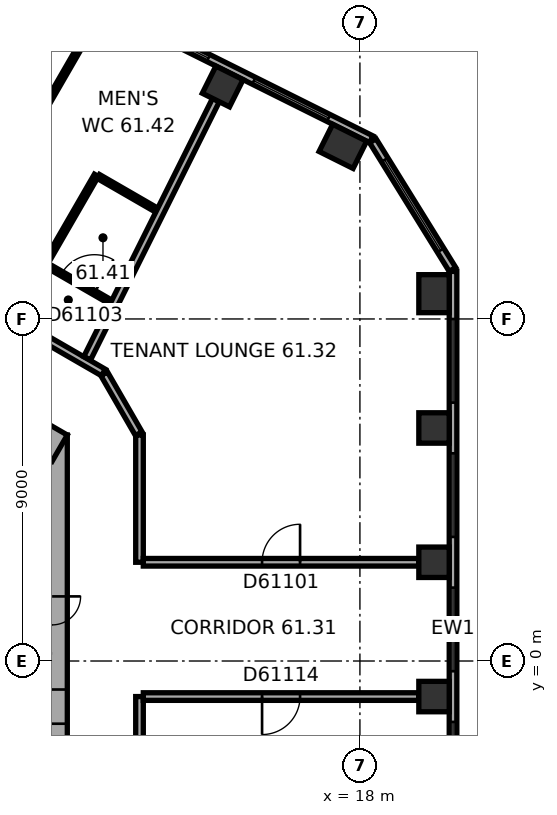
"""IFC4 building model, lengths in metres.
Left out: names, types, materials, properties, quantities, classifications, styles, units other than length and angle.
Written with IfcOpenShell. Run it as: python <this file> out.ifc"""

import sys

from ifc_helpers import new_model, si_unit, direction, frame, frame_2d, origin, origin_2d, place, context, subcontext, project, spatial, rectangle, extrude, element, fill, save


model = new_model("IFC4")
c1 = context("Model", 3, precision=1e-05, world=origin(), true_north=direction((0.0, 1.0)))
c2 = subcontext(c1, "Body", "Model", "MODEL_VIEW")
j1 = project(units=[si_unit("LENGTHUNIT", "METRE"), si_unit("PLANEANGLEUNIT", "RADIAN")], contexts=[c1])
p1 = place(None, origin())
s1 = spatial("IfcSite", under=j1, at=p1, CompositionType="ELEMENT")
p2 = place(p1, origin())
s2 = spatial("IfcBuilding", under=s1, at=p2, CompositionType="ELEMENT")
p3 = place(p2, frame((0.0, 0.0, 247.6)))
s3 = spatial("IfcBuildingStorey", under=s2, at=p3, CompositionType="ELEMENT", Elevation=247.6)
for number, where, z_axis, x_axis in (
    (1, (19.95, -0.936, 0.0), (0.0, 0.0, 1.0), (0.0, 1.0, 0.0)),
    (2, (19.95, 2.598, 0.0), (0.0, 0.0, 1.0), (0.0, 1.0, 0.0)),
    (3, (19.95, 6.132, 0.0), (0.0, 0.0, 1.0), (0.0, 1.0, 0.0)),
):
    element("IfcColumn", number, at=place(p3, frame(where, z_axis=z_axis, x_axis=x_axis)), inside=s3, PredefinedType="COLUMN", context=c2, shape_type="SweptSolid", body=[
        extrude(rectangle(XDim=0.8, YDim=0.8, at=origin_2d()), origin(), (0.0, 0.0, 1.0), 3.7),
    ])
for number, where, z_axis, x_axis in (
    (4, (19.95, 9.665, 0.0), (0.0, 0.0, 1.0), (0.0, 1.0, 0.0)),
    (5, (17.552, 13.541, 0.0), (0.0, 0.0, 1.0), (-0.895, 0.446, 0.0)),
):
    element("IfcColumn", number, at=place(p3, frame(where, z_axis=z_axis, x_axis=x_axis)), inside=s3, PredefinedType="COLUMN", context=c2, shape_type="SweptSolid", body=[
        extrude(rectangle(XDim=1.0, YDim=0.8, at=origin_2d()), origin(), (0.0, 0.0, 1.0), 3.7),
    ])
p4 = place(p3, frame((14.389, 15.118, 0.0), z_axis=(0.0, 0.0, 1.0), x_axis=(-0.894934361602, 0.44619781311, 0.0)))
e6 = element("IfcColumn", 6, at=p4, inside=s3, PredefinedType="COLUMN", context=c2, shape_type="SweptSolid", body=[
    extrude(rectangle(XDim=0.8, YDim=0.8, at=origin_2d()), origin(), (0.0, 0.0, 1.0), 3.7),
])
p5 = place(p3, frame((9.9, -5.947, 0.0), z_axis=(0.0, 0.0, 1.0), x_axis=(0.0, 1.0, 0.0)))
e7 = element("IfcWall", 7, at=p5, inside=s3, PredefinedType="SHEAR", context=c2, shape_type="SweptSolid", body=[
    extrude(rectangle(XDim=11.894, YDim=0.8, at=frame_2d((5.947, 0.0))), origin(), (0.0, 0.0, 1.0), 3.7),
])
p6 = place(p5, frame((6.147, 0.0, 0.0)))
e8 = element("IfcOpeningElement", 8, at=p6, cuts=e7, PredefinedType="OPENING", context=c2, shape_type="SweptSolid", body=[
    extrude(rectangle(XDim=1.5, YDim=2.1, at=frame_2d((0.75, 1.05))), frame((0.0, 0.41, 0.0), z_axis=(0.0, -1.0, 0.0), x_axis=(1.0, 0.0, 0.0)), (0.0, 0.0, 1.0), 0.82),
])
p7 = place(p5, frame((1.697, 0.0, 0.0)))
e9 = element("IfcOpeningElement", 9, at=p7, cuts=e7, PredefinedType="OPENING", context=c2, shape_type="SweptSolid", body=[
    extrude(rectangle(XDim=0.9, YDim=2.1, at=frame_2d((0.45, 1.05))), frame((0.0, 0.41, 0.0), z_axis=(0.0, -1.0, 0.0), x_axis=(1.0, 0.0, 0.0)), (0.0, 0.0, 1.0), 0.82),
])
p8 = place(p5, frame((4.297, 0.0, 0.0)))
e10 = element("IfcOpeningElement", 10, at=p8, cuts=e7, PredefinedType="OPENING", context=c2, shape_type="SweptSolid", body=[
    extrude(rectangle(XDim=0.9, YDim=2.1, at=frame_2d((0.45, 1.05))), frame((0.0, 0.41, 0.0), z_axis=(0.0, -1.0, 0.0), x_axis=(1.0, 0.0, 0.0)), (0.0, 0.0, 1.0), 0.82),
])
p9 = place(p3, frame((10.1, 5.6, 0.0), z_axis=(0.0, 0.0, 1.0), x_axis=(-0.866023897231, 0.500002609418, 0.0)))
e11 = element("IfcWall", 11, at=p9, inside=s3, PredefinedType="SHEAR", context=c2, shape_type="SweptSolid", body=[
    extrude(rectangle(XDim=11.894, YDim=0.8, at=frame_2d((5.947, 0.0))), origin(), (0.0, 0.0, 1.0), 3.7),
])
p10 = place(p9, frame((3.897, 0.0, 0.0)))
e12 = element("IfcOpeningElement", 12, at=p10, cuts=e11, PredefinedType="OPENING", context=c2, shape_type="SweptSolid", body=[
    extrude(rectangle(XDim=0.9, YDim=2.1, at=frame_2d((0.45, 1.05))), frame((0.0, 0.41, 0.0), z_axis=(0.0, -1.0, 0.0), x_axis=(1.0, 0.0, 0.0)), (0.0, 0.0, 1.0), 0.82),
])
p11 = place(p9, frame((7.797, 0.0, 0.0)))
e13 = element("IfcOpeningElement", 13, at=p11, cuts=e11, PredefinedType="OPENING", context=c2, shape_type="SweptSolid", body=[
    extrude(rectangle(XDim=0.9, YDim=2.1, at=frame_2d((0.45, 1.05))), frame((0.0, 0.41, 0.0), z_axis=(0.0, -1.0, 0.0), x_axis=(1.0, 0.0, 0.0)), (0.0, 0.0, 1.0), 0.82),
])
p12 = place(p3, frame((20.45, -8.59, 0.0), z_axis=(0.0, 0.0, 1.0), x_axis=(0.0, 1.0, 0.0)))
e14 = element("IfcWall", 14, at=p12, inside=s3, PredefinedType="STANDARD", context=c2, shape_type="SweptSolid", body=[
    extrude(rectangle(XDim=18.841, YDim=0.2, at=frame_2d((9.421, 0.0))), origin(), (0.0, 0.0, 1.0), 3.7),
])
p13 = place(p12, frame((1.254, 0.0, 0.9)))
e15 = element("IfcOpeningElement", 15, at=p13, cuts=e14, PredefinedType="OPENING", context=c2, shape_type="SweptSolid", body=[
    extrude(rectangle(XDim=2.2, YDim=2.0, at=frame_2d((1.1, 1.0))), frame((0.0, 0.11, 0.0), z_axis=(0.0, -1.0, 0.0), x_axis=(1.0, 0.0, 0.0)), (0.0, 0.0, 1.0), 0.22),
])
p14 = place(p12, frame((4.788, 0.0, 0.9)))
e16 = element("IfcOpeningElement", 16, at=p14, cuts=e14, PredefinedType="OPENING", context=c2, shape_type="SweptSolid", body=[
    extrude(rectangle(XDim=2.2, YDim=2.0, at=frame_2d((1.1, 1.0))), frame((0.0, 0.11, 0.0), z_axis=(0.0, -1.0, 0.0), x_axis=(1.0, 0.0, 0.0)), (0.0, 0.0, 1.0), 0.22),
])
p15 = place(p12, frame((8.322, 0.0, 0.9)))
e17 = element("IfcOpeningElement", 17, at=p15, cuts=e14, PredefinedType="OPENING", context=c2, shape_type="SweptSolid", body=[
    extrude(rectangle(XDim=2.2, YDim=2.0, at=frame_2d((1.1, 1.0))), frame((0.0, 0.11, 0.0), z_axis=(0.0, -1.0, 0.0), x_axis=(1.0, 0.0, 0.0)), (0.0, 0.0, 1.0), 0.22),
])
p16 = place(p12, frame((11.855, 0.0, 0.9)))
e18 = element("IfcOpeningElement", 18, at=p16, cuts=e14, PredefinedType="OPENING", context=c2, shape_type="SweptSolid", body=[
    extrude(rectangle(XDim=2.2, YDim=2.0, at=frame_2d((1.1, 1.0))), frame((0.0, 0.11, 0.0), z_axis=(0.0, -1.0, 0.0), x_axis=(1.0, 0.0, 0.0)), (0.0, 0.0, 1.0), 0.22),
])
p17 = place(p12, frame((15.389, 0.0, 0.9)))
e19 = element("IfcOpeningElement", 19, at=p17, cuts=e14, PredefinedType="OPENING", context=c2, shape_type="SweptSolid", body=[
    extrude(rectangle(XDim=2.2, YDim=2.0, at=frame_2d((1.1, 1.0))), frame((0.0, 0.11, 0.0), z_axis=(0.0, -1.0, 0.0), x_axis=(1.0, 0.0, 0.0)), (0.0, 0.0, 1.0), 0.22),
])
p18 = place(p3, frame((20.435, 10.304, 0.0), z_axis=(0.0, 0.0, 1.0), x_axis=(-0.526202661606, 0.850359194058, 0.0)))
e20 = element("IfcWall", 20, at=p18, inside=s3, PredefinedType="STANDARD", context=c2, shape_type="SweptSolid", body=[
    extrude(rectangle(XDim=3.983, YDim=0.2, at=frame_2d((1.991, 0.0))), origin(), (0.0, 0.0, 1.0), 3.7),
])
p19 = place(p18, frame((0.591, 0.0, 0.9)))
e21 = element("IfcOpeningElement", 21, at=p19, cuts=e20, PredefinedType="OPENING", context=c2, shape_type="SweptSolid", body=[
    extrude(rectangle(XDim=2.8, YDim=2.0, at=frame_2d((1.4, 1.0))), frame((0.0, 0.11, 0.0), z_axis=(0.0, -1.0, 0.0), x_axis=(1.0, 0.0, 0.0)), (0.0, 0.0, 1.0), 0.22),
])
p20 = place(p3, frame((18.299, 13.727, 0.0), z_axis=(0.0, 0.0, 1.0), x_axis=(-0.894934554817, 0.44619742558, 0.0)))
e22 = element("IfcWall", 22, at=p20, inside=s3, PredefinedType="STANDARD", context=c2, shape_type="SweptSolid", body=[
    extrude(rectangle(XDim=18.841, YDim=0.2, at=frame_2d((9.421, 0.0))), origin(), (0.0, 0.0, 1.0), 3.7),
])
p21 = place(p20, frame((1.253, 0.0, 0.9)))
e23 = element("IfcOpeningElement", 23, at=p21, cuts=e22, PredefinedType="OPENING", context=c2, shape_type="SweptSolid", body=[
    extrude(rectangle(XDim=2.2, YDim=2.0, at=frame_2d((1.1, 1.0))), frame((0.0, 0.11, 0.0), z_axis=(0.0, -1.0, 0.0), x_axis=(1.0, 0.0, 0.0)), (0.0, 0.0, 1.0), 0.22),
])
p22 = place(p20, frame((4.786, 0.0, 0.9)))
e24 = element("IfcOpeningElement", 24, at=p22, cuts=e22, PredefinedType="OPENING", context=c2, shape_type="SweptSolid", body=[
    extrude(rectangle(XDim=2.2, YDim=2.0, at=frame_2d((1.1, 1.0))), frame((0.0, 0.11, 0.0), z_axis=(0.0, -1.0, 0.0), x_axis=(1.0, 0.0, 0.0)), (0.0, 0.0, 1.0), 0.22),
])
p23 = place(p20, frame((8.32, 0.0, 0.9)))
e25 = element("IfcOpeningElement", 25, at=p23, cuts=e22, PredefinedType="OPENING", context=c2, shape_type="SweptSolid", body=[
    extrude(rectangle(XDim=2.2, YDim=2.0, at=frame_2d((1.1, 1.0))), frame((0.0, 0.11, 0.0), z_axis=(0.0, -1.0, 0.0), x_axis=(1.0, 0.0, 0.0)), (0.0, 0.0, 1.0), 0.22),
])
p24 = place(p20, frame((11.854, 0.0, 0.9)))
e26 = element("IfcOpeningElement", 26, at=p24, cuts=e22, PredefinedType="OPENING", context=c2, shape_type="SweptSolid", body=[
    extrude(rectangle(XDim=2.2, YDim=2.0, at=frame_2d((1.1, 1.0))), frame((0.0, 0.11, 0.0), z_axis=(0.0, -1.0, 0.0), x_axis=(1.0, 0.0, 0.0)), (0.0, 0.0, 1.0), 0.22),
])
p25 = place(p20, frame((15.387, 0.0, 0.9)))
e27 = element("IfcOpeningElement", 27, at=p25, cuts=e22, PredefinedType="OPENING", context=c2, shape_type="SweptSolid", body=[
    extrude(rectangle(XDim=2.2, YDim=2.0, at=frame_2d((1.1, 1.0))), frame((0.0, 0.11, 0.0), z_axis=(0.0, -1.0, 0.0), x_axis=(1.0, 0.0, 0.0)), (0.0, 0.0, 1.0), 0.22),
])
p26 = place(p3, frame((10.805, 16.458, 0.0), z_axis=(0.0, 0.0, 1.0), x_axis=(-0.500025478307, -0.866010693377, 0.0)))
e28 = element("IfcWall", 28, at=p26, inside=s3, PredefinedType="PARTITIONING", context=c2, shape_type="SweptSolid", body=[
    extrude(rectangle(XDim=5.696, YDim=0.12, at=frame_2d((2.848, 0.0))), origin(), (0.0, 0.0, 1.0), 2.87),
])
p27 = place(p3, frame((11.065, 12.78, 0.0), z_axis=(0.0, 0.0, 1.0), x_axis=(-0.499938597367, -0.866060851709, 0.0)))
e29 = element("IfcWall", 29, at=p27, inside=s3, PredefinedType="PARTITIONING", context=c2, shape_type="SweptSolid", body=[
    extrude(rectangle(XDim=2.64, YDim=0.12, at=frame_2d((1.32, 0.0))), origin(), (0.0, 0.0, 1.0), 3.42),
])
p28 = place(p3, frame((11.25, 7.592, 0.0), z_axis=(0.0, 0.0, 1.0), x_axis=(-0.866024037175, 0.500002367029, 0.0)))
e30 = element("IfcWall", 30, at=p28, inside=s3, PredefinedType="PARTITIONING", context=c2, shape_type="SweptSolid", body=[
    extrude(rectangle(XDim=11.854, YDim=0.2, at=frame_2d((5.927, 0.0))), origin(), (0.0, 0.0, 1.0), 3.42),
])
p29 = place(p28, frame((3.59, 0.0, 0.0)))
e31 = element("IfcOpeningElement", 31, at=p29, cuts=e30, PredefinedType="OPENING", context=c2, shape_type="SweptSolid", body=[
    extrude(rectangle(XDim=1.0, YDim=2.1, at=frame_2d((0.5, 1.05))), frame((0.0, 0.11, 0.0), z_axis=(0.0, -1.0, 0.0), x_axis=(1.0, 0.0, 0.0)), (0.0, 0.0, 1.0), 0.22),
])
p30 = place(p3, frame((11.447, 9.441, 0.0), z_axis=(0.0, 0.0, 1.0), x_axis=(-0.866016001002, 0.500016285743, 0.0)))
e32 = element("IfcWall", 32, at=p30, inside=s3, PredefinedType="PARTITIONING", context=c2, shape_type="SweptSolid", body=[
    extrude(rectangle(XDim=6.881, YDim=0.12, at=frame_2d((3.44, 0.0))), origin(), (0.0, 0.0, 1.0), 3.42),
])
p31 = place(p30, frame((0.5, 0.0, 0.0)))
e33 = element("IfcOpeningElement", 33, at=p31, cuts=e32, PredefinedType="OPENING", context=c2, shape_type="SweptSolid", body=[
    extrude(rectangle(XDim=1.0, YDim=2.1, at=frame_2d((0.5, 1.05))), frame((0.0, 0.07, 0.0), z_axis=(0.0, -1.0, 0.0), x_axis=(1.0, 0.0, 0.0)), (0.0, 0.0, 1.0), 0.14),
])
p32 = place(p30, frame((2.583, 0.0, 0.0)))
e34 = element("IfcOpeningElement", 34, at=p32, cuts=e32, PredefinedType="OPENING", context=c2, shape_type="SweptSolid", body=[
    extrude(rectangle(XDim=0.9, YDim=2.1, at=frame_2d((0.45, 1.05))), frame((0.0, 0.07, 0.0), z_axis=(0.0, -1.0, 0.0), x_axis=(1.0, 0.0, 0.0)), (0.0, 0.0, 1.0), 0.14),
])
p33 = place(p30, frame((5.023, 0.0, 0.0)))
e35 = element("IfcOpeningElement", 35, at=p33, cuts=e32, PredefinedType="OPENING", context=c2, shape_type="SweptSolid", body=[
    extrude(rectangle(XDim=0.9, YDim=2.1, at=frame_2d((0.45, 1.05))), frame((0.0, 0.07, 0.0), z_axis=(0.0, -1.0, 0.0), x_axis=(1.0, 0.0, 0.0)), (0.0, 0.0, 1.0), 0.14),
])
p34 = place(p3, frame((12.18, 5.981, 0.0), z_axis=(0.0, 0.0, 1.0), x_axis=(-0.499904359745, 0.86608061467, 0.0)))
e36 = element("IfcWall", 36, at=p34, inside=s3, PredefinedType="PARTITIONING", context=c2, shape_type="SweptSolid", body=[
    extrude(rectangle(XDim=1.82, YDim=0.2, at=frame_2d((0.91, 0.0))), origin(), (0.0, 0.0, 1.0), 3.42),
])
p35 = place(p3, frame((12.2, -5.907, 0.0), z_axis=(0.0, 0.0, 1.0), x_axis=(0.0, 1.0, 0.0)))
e37 = element("IfcWall", 37, at=p35, inside=s3, PredefinedType="PARTITIONING", context=c2, shape_type="SweptSolid", body=[
    extrude(rectangle(XDim=4.971, YDim=0.2, at=frame_2d((2.486, 0.0))), origin(), (0.0, 0.0, 1.0), 3.42),
])
p36 = place(p3, frame((12.2, 2.598, 0.0), z_axis=(0.0, 0.0, 1.0), x_axis=(0.0, 1.0, 0.0)))
e38 = element("IfcWall", 38, at=p36, inside=s3, PredefinedType="PARTITIONING", context=c2, shape_type="SweptSolid", body=[
    extrude(rectangle(XDim=3.349, YDim=0.2, at=frame_2d((1.674, 0.0))), origin(), (0.0, 0.0, 1.0), 3.42),
])
p37 = place(p3, frame((12.3, -0.936, 0.0), z_axis=(0.0, 0.0, 1.0), x_axis=(1.0, 0.0, 0.0)))
e39 = element("IfcWall", 39, at=p37, inside=s3, PredefinedType="PARTITIONING", context=c2, shape_type="SweptSolid", body=[
    extrude(rectangle(XDim=7.25, YDim=0.2, at=frame_2d((3.625, 0.0))), origin(), (0.0, 0.0, 1.0), 2.87),
])
p38 = place(p37, frame((3.125, 0.0, 0.0)))
e40 = element("IfcOpeningElement", 40, at=p38, cuts=e39, PredefinedType="OPENING", context=c2, shape_type="SweptSolid", body=[
    extrude(rectangle(XDim=1.0, YDim=2.1, at=frame_2d((0.5, 1.05))), frame((0.0, 0.11, 0.0), z_axis=(0.0, -1.0, 0.0), x_axis=(1.0, 0.0, 0.0)), (0.0, 0.0, 1.0), 0.22),
])
p39 = place(p3, frame((12.654, 11.862, 0.0), z_axis=(0.0, 0.0, 1.0), x_axis=(-0.866025242659, 0.500000279077, 0.0)))
e41 = element("IfcWall", 41, at=p39, inside=s3, PredefinedType="PARTITIONING", context=c2, shape_type="SweptSolid", body=[
    extrude(rectangle(XDim=1.775, YDim=0.12, at=frame_2d((0.887, 0.0))), origin(), (0.0, 0.0, 1.0), 3.42),
])
p40 = place(p3, frame((14.211, 14.76, 0.0), z_axis=(0.0, 0.0, 1.0), x_axis=(-0.446197176117, -0.894934679195, 0.0)))
e42 = element("IfcWall", 42, at=p40, inside=s3, PredefinedType="PARTITIONING", context=c2, shape_type="SweptSolid", body=[
    extrude(rectangle(XDim=7.592, YDim=0.2, at=frame_2d((3.796, 0.0))), origin(), (0.0, 0.0, 1.0), 3.42),
])
p41 = place(p3, frame((19.55, 2.598, 0.0), z_axis=(0.0, 0.0, 1.0), x_axis=(-1.0, 0.0, 0.0)))
e43 = element("IfcWall", 43, at=p41, inside=s3, PredefinedType="PARTITIONING", context=c2, shape_type="SweptSolid", body=[
    extrude(rectangle(XDim=7.25, YDim=0.2, at=frame_2d((3.625, 0.0))), origin(), (0.0, 0.0, 1.0), 3.42),
])
p42 = place(p41, frame((3.125, 0.0, 0.0)))
e44 = element("IfcOpeningElement", 44, at=p42, cuts=e43, PredefinedType="OPENING", context=c2, shape_type="SweptSolid", body=[
    extrude(rectangle(XDim=1.0, YDim=2.1, at=frame_2d((0.5, 1.05))), frame((0.0, 0.11, 0.0), z_axis=(0.0, -1.0, 0.0), x_axis=(1.0, 0.0, 0.0)), (0.0, 0.0, 1.0), 0.22),
])
p43 = place(p14, origin())
e45 = element("IfcWindow", 45, at=p43, inside=s3, PartitioningType="SINGLE_PANEL", PredefinedType="WINDOW", context=c2, shape_type="SweptSolid", body=[
    extrude(rectangle(XDim=2.2, YDim=2.0, at=frame_2d((1.1, 1.0))), frame((0.0, 0.03, 0.0), z_axis=(0.0, -1.0, 0.0), x_axis=(1.0, 0.0, 0.0)), (0.0, 0.0, 1.0), 0.06),
])
fill(e16, e45)
p44 = place(p15, origin())
e46 = element("IfcWindow", 46, at=p44, inside=s3, PartitioningType="SINGLE_PANEL", PredefinedType="WINDOW", context=c2, shape_type="SweptSolid", body=[
    extrude(rectangle(XDim=2.2, YDim=2.0, at=frame_2d((1.1, 1.0))), frame((0.0, 0.03, 0.0), z_axis=(0.0, -1.0, 0.0), x_axis=(1.0, 0.0, 0.0)), (0.0, 0.0, 1.0), 0.06),
])
fill(e17, e46)
p45 = place(p16, origin())
e47 = element("IfcWindow", 47, at=p45, inside=s3, PartitioningType="SINGLE_PANEL", PredefinedType="WINDOW", context=c2, shape_type="SweptSolid", body=[
    extrude(rectangle(XDim=2.2, YDim=2.0, at=frame_2d((1.1, 1.0))), frame((0.0, 0.03, 0.0), z_axis=(0.0, -1.0, 0.0), x_axis=(1.0, 0.0, 0.0)), (0.0, 0.0, 1.0), 0.06),
])
fill(e18, e47)
p46 = place(p17, origin())
e48 = element("IfcWindow", 48, at=p46, inside=s3, PartitioningType="SINGLE_PANEL", PredefinedType="WINDOW", context=c2, shape_type="SweptSolid", body=[
    extrude(rectangle(XDim=2.2, YDim=2.0, at=frame_2d((1.1, 1.0))), frame((0.0, 0.03, 0.0), z_axis=(0.0, -1.0, 0.0), x_axis=(1.0, 0.0, 0.0)), (0.0, 0.0, 1.0), 0.06),
])
fill(e19, e48)
p47 = place(p19, origin())
e49 = element("IfcWindow", 49, at=p47, inside=s3, PartitioningType="SINGLE_PANEL", PredefinedType="WINDOW", context=c2, shape_type="SweptSolid", body=[
    extrude(rectangle(XDim=2.8, YDim=2.0, at=frame_2d((1.4, 1.0))), frame((0.0, 0.03, 0.0), z_axis=(0.0, -1.0, 0.0), x_axis=(1.0, 0.0, 0.0)), (0.0, 0.0, 1.0), 0.06),
])
fill(e21, e49)
p48 = place(p21, origin())
e50 = element("IfcWindow", 50, at=p48, inside=s3, PartitioningType="SINGLE_PANEL", PredefinedType="WINDOW", context=c2, shape_type="SweptSolid", body=[
    extrude(rectangle(XDim=2.2, YDim=2.0, at=frame_2d((1.1, 1.0))), frame((0.0, 0.03, 0.0), z_axis=(0.0, -1.0, 0.0), x_axis=(1.0, 0.0, 0.0)), (0.0, 0.0, 1.0), 0.06),
])
fill(e23, e50)
p49 = place(p22, origin())
e51 = element("IfcWindow", 51, at=p49, inside=s3, PartitioningType="SINGLE_PANEL", PredefinedType="WINDOW", context=c2, shape_type="SweptSolid", body=[
    extrude(rectangle(XDim=2.2, YDim=2.0, at=frame_2d((1.1, 1.0))), frame((0.0, 0.03, 0.0), z_axis=(0.0, -1.0, 0.0), x_axis=(1.0, 0.0, 0.0)), (0.0, 0.0, 1.0), 0.06),
])
fill(e24, e51)
p50 = place(p6, origin())
e52 = element("IfcDoor", 52, at=p50, inside=s3, OperationType="DOUBLE_DOOR_SINGLE_SWING", PredefinedType="DOOR", context=c2, shape_type="SweptSolid", body=[
    extrude(rectangle(XDim=1.5, YDim=2.1, at=frame_2d((0.75, 1.05))), frame((0.0, 0.025, 0.0), z_axis=(0.0, -1.0, 0.0), x_axis=(1.0, 0.0, 0.0)), (0.0, 0.0, 1.0), 0.05),
])
fill(e8, e52)
p51 = place(p8, origin())
e53 = element("IfcDoor", 53, at=p51, inside=s3, OperationType="SINGLE_SWING_LEFT", PredefinedType="DOOR", context=c2, shape_type="SweptSolid", body=[
    extrude(rectangle(XDim=0.9, YDim=2.1, at=frame_2d((0.45, 1.05))), frame((0.0, 0.025, 0.0), z_axis=(0.0, -1.0, 0.0), x_axis=(1.0, 0.0, 0.0)), (0.0, 0.0, 1.0), 0.05),
])
fill(e10, e53)
p52 = place(p42, origin())
e54 = element("IfcDoor", 54, at=p52, inside=s3, OperationType="SINGLE_SWING_LEFT", PredefinedType="DOOR", context=c2, shape_type="SweptSolid", body=[
    extrude(rectangle(XDim=1.0, YDim=2.1, at=frame_2d((0.5, 1.05))), frame((0.0, 0.025, 0.0), z_axis=(0.0, -1.0, 0.0), x_axis=(1.0, 0.0, 0.0)), (0.0, 0.0, 1.0), 0.05),
])
fill(e44, e54)
p53 = place(p31, origin())
e55 = element("IfcDoor", 55, at=p53, inside=s3, OperationType="SINGLE_SWING_LEFT", PredefinedType="DOOR", context=c2, shape_type="SweptSolid", body=[
    extrude(rectangle(XDim=1.0, YDim=2.1, at=frame_2d((0.5, 1.05))), frame((0.0, 0.025, 0.0), z_axis=(0.0, -1.0, 0.0), x_axis=(1.0, 0.0, 0.0)), (0.0, 0.0, 1.0), 0.05),
])
fill(e33, e55)
p54 = place(p38, origin())
e56 = element("IfcDoor", 56, at=p54, inside=s3, OperationType="SINGLE_SWING_LEFT", PredefinedType="DOOR", context=c2, shape_type="SweptSolid", body=[
    extrude(rectangle(XDim=1.0, YDim=2.1, at=frame_2d((0.5, 1.05))), frame((0.0, 0.025, 0.0), z_axis=(0.0, -1.0, 0.0), x_axis=(1.0, 0.0, 0.0)), (0.0, 0.0, 1.0), 0.05),
])
fill(e40, e56)
save(model, sys.argv[1])
